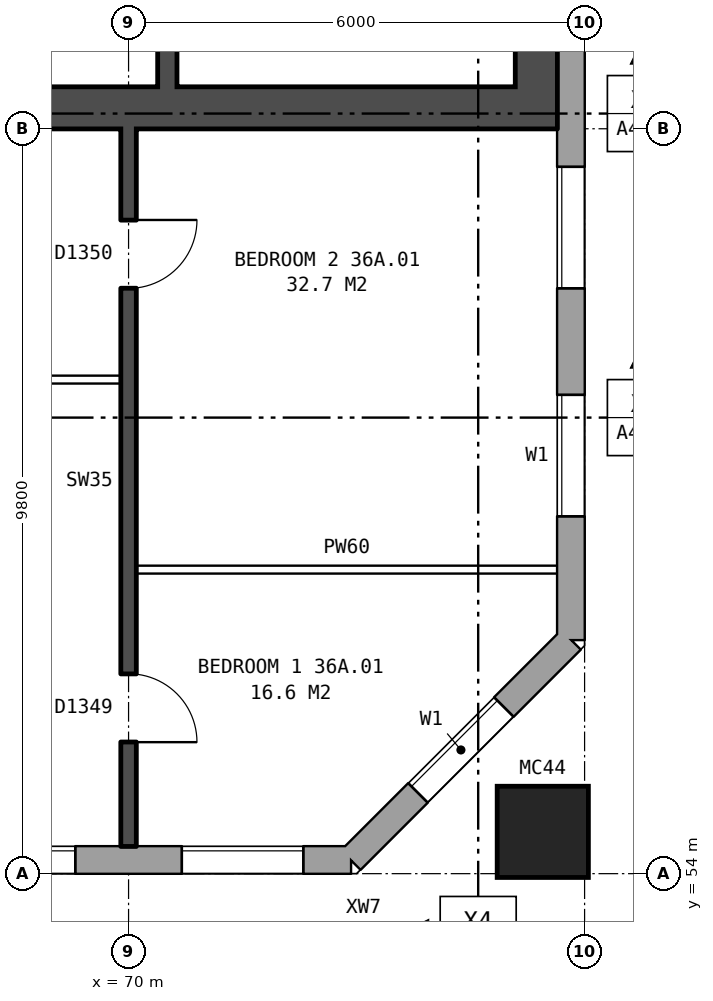
"""IFC4 building model, lengths in metres.
Left out: names, types, materials, properties, quantities, classifications, styles, units other than length and angle.
Written with IfcOpenShell. Run it as: python <this file> out.ifc"""

import sys

from ifc_helpers import new_model, si_unit, direction, frame, frame_2d, origin, origin_2d, place, context, subcontext, project, spatial, rectangle, hollow_rectangle, extrude, element, fill, save


model = new_model("IFC4")
c1 = context("Model", 3, precision=1e-05, world=origin(), true_north=direction((0.0, 1.0)))
c2 = subcontext(c1, "Body", "Model", "MODEL_VIEW")
j1 = project(units=[si_unit("LENGTHUNIT", "METRE"), si_unit("PLANEANGLEUNIT", "RADIAN")], contexts=[c1])
p1 = place(None, origin())
s1 = spatial("IfcSite", under=j1, at=p1, CompositionType="ELEMENT")
p2 = place(p1, origin())
s2 = spatial("IfcBuilding", under=s1, at=p2, CompositionType="ELEMENT")
p3 = place(p2, frame((0.0, 0.0, 129.9)))
s3 = spatial("IfcBuildingStorey", under=s2, at=p3, CompositionType="ELEMENT", Elevation=129.9)
p4 = place(p3, frame((75.45, 54.55, 0.0), z_axis=(0.0, 0.0, 1.0), x_axis=(1.0, 0.0, 0.0)))
e1 = element("IfcColumn", 1, at=p4, inside=s3, PredefinedType="COLUMN", context=c2, shape_type="SweptSolid", body=[
    extrude(hollow_rectangle(XDim=1.2, YDim=1.2, WallThickness=0.065, at=origin_2d()), origin(), (0.0, 0.0, 1.0), 3.1),
])
p5 = place(p3, frame((29.825, 54.18, 0.0), z_axis=(0.0, 0.0, 1.0), x_axis=(1.0, 0.0, 0.0)))
e2 = element("IfcWall", 2, at=p5, inside=s3, PredefinedType="STANDARD", context=c2, shape_type="SweptSolid", body=[
    extrude(rectangle(XDim=43.101, YDim=0.36, at=frame_2d((21.55, 0.0))), origin(), (0.0, 0.0, 1.0), 2.85),
])
p6 = place(p5, frame((1.875, 0.0, 0.8)))
e3 = element("IfcOpeningElement", 3, at=p6, cuts=e2, PredefinedType="OPENING", context=c2, shape_type="SweptSolid", body=[
    extrude(rectangle(XDim=1.6, YDim=1.8, at=frame_2d((0.8, 0.9))), frame((0.0, 0.19, 0.0), z_axis=(0.0, -1.0, 0.0), x_axis=(1.0, 0.0, 0.0)), (0.0, 0.0, 1.0), 0.38),
])
p7 = place(p5, frame((4.875, 0.0, 0.8)))
e4 = element("IfcOpeningElement", 4, at=p7, cuts=e2, PredefinedType="OPENING", context=c2, shape_type="SweptSolid", body=[
    extrude(rectangle(XDim=1.6, YDim=1.8, at=frame_2d((0.8, 0.9))), frame((0.0, 0.19, 0.0), z_axis=(0.0, -1.0, 0.0), x_axis=(1.0, 0.0, 0.0)), (0.0, 0.0, 1.0), 0.38),
])
p8 = place(p5, frame((6.775, 0.0, 0.8)))
e5 = element("IfcOpeningElement", 5, at=p8, cuts=e2, PredefinedType="OPENING", context=c2, shape_type="SweptSolid", body=[
    extrude(rectangle(XDim=1.6, YDim=1.8, at=frame_2d((0.8, 0.9))), frame((0.0, 0.19, 0.0), z_axis=(0.0, -1.0, 0.0), x_axis=(1.0, 0.0, 0.0)), (0.0, 0.0, 1.0), 0.38),
])
p9 = place(p5, frame((10.875, 0.0, 0.8)))
e6 = element("IfcOpeningElement", 6, at=p9, cuts=e2, PredefinedType="OPENING", context=c2, shape_type="SweptSolid", body=[
    extrude(rectangle(XDim=0.8, YDim=0.9, at=frame_2d((0.4, 0.45))), frame((0.0, 0.19, 0.0), z_axis=(0.0, -1.0, 0.0), x_axis=(1.0, 0.0, 0.0)), (0.0, 0.0, 1.0), 0.38),
])
p10 = place(p5, frame((13.875, 0.0, 0.8)))
e7 = element("IfcOpeningElement", 7, at=p10, cuts=e2, PredefinedType="OPENING", context=c2, shape_type="SweptSolid", body=[
    extrude(rectangle(XDim=1.6, YDim=1.8, at=frame_2d((0.8, 0.9))), frame((0.0, 0.19, 0.0), z_axis=(0.0, -1.0, 0.0), x_axis=(1.0, 0.0, 0.0)), (0.0, 0.0, 1.0), 0.38),
])
p11 = place(p5, frame((16.875, 0.0, 0.8)))
e8 = element("IfcOpeningElement", 8, at=p11, cuts=e2, PredefinedType="OPENING", context=c2, shape_type="SweptSolid", body=[
    extrude(rectangle(XDim=1.6, YDim=1.8, at=frame_2d((0.8, 0.9))), frame((0.0, 0.19, 0.0), z_axis=(0.0, -1.0, 0.0), x_axis=(1.0, 0.0, 0.0)), (0.0, 0.0, 1.0), 0.38),
])
p12 = place(p5, frame((19.875, 0.0, 0.8)))
e9 = element("IfcOpeningElement", 9, at=p12, cuts=e2, PredefinedType="OPENING", context=c2, shape_type="SweptSolid", body=[
    extrude(rectangle(XDim=1.6, YDim=1.8, at=frame_2d((0.8, 0.9))), frame((0.0, 0.19, 0.0), z_axis=(0.0, -1.0, 0.0), x_axis=(1.0, 0.0, 0.0)), (0.0, 0.0, 1.0), 0.38),
])
p13 = place(p5, frame((22.875, 0.0, 0.8)))
e10 = element("IfcOpeningElement", 10, at=p13, cuts=e2, PredefinedType="OPENING", context=c2, shape_type="SweptSolid", body=[
    extrude(rectangle(XDim=1.6, YDim=1.8, at=frame_2d((0.8, 0.9))), frame((0.0, 0.19, 0.0), z_axis=(0.0, -1.0, 0.0), x_axis=(1.0, 0.0, 0.0)), (0.0, 0.0, 1.0), 0.38),
])
p14 = place(p5, frame((25.875, 0.0, 0.8)))
e11 = element("IfcOpeningElement", 11, at=p14, cuts=e2, PredefinedType="OPENING", context=c2, shape_type="SweptSolid", body=[
    extrude(rectangle(XDim=1.6, YDim=1.8, at=frame_2d((0.8, 0.9))), frame((0.0, 0.19, 0.0), z_axis=(0.0, -1.0, 0.0), x_axis=(1.0, 0.0, 0.0)), (0.0, 0.0, 1.0), 0.38),
])
p15 = place(p5, frame((28.875, 0.0, 0.8)))
e12 = element("IfcOpeningElement", 12, at=p15, cuts=e2, PredefinedType="OPENING", context=c2, shape_type="SweptSolid", body=[
    extrude(rectangle(XDim=1.6, YDim=1.8, at=frame_2d((0.8, 0.9))), frame((0.0, 0.19, 0.0), z_axis=(0.0, -1.0, 0.0), x_axis=(1.0, 0.0, 0.0)), (0.0, 0.0, 1.0), 0.38),
])
p16 = place(p5, frame((31.325, 0.0, 0.15)))
e13 = element("IfcOpeningElement", 13, at=p16, cuts=e2, PredefinedType="OPENING", context=c2, shape_type="SweptSolid", body=[
    extrude(rectangle(XDim=0.6, YDim=1.8, at=frame_2d((0.3, 0.9))), frame((0.0, 0.19, 0.0), z_axis=(0.0, -1.0, 0.0), x_axis=(1.0, 0.0, 0.0)), (0.0, 0.0, 1.0), 0.38),
])
p17 = place(p5, frame((34.875, 0.0, 0.8)))
e14 = element("IfcOpeningElement", 14, at=p17, cuts=e2, PredefinedType="OPENING", context=c2, shape_type="SweptSolid", body=[
    extrude(rectangle(XDim=1.6, YDim=1.8, at=frame_2d((0.8, 0.9))), frame((0.0, 0.19, 0.0), z_axis=(0.0, -1.0, 0.0), x_axis=(1.0, 0.0, 0.0)), (0.0, 0.0, 1.0), 0.38),
])
p18 = place(p5, frame((37.875, 0.0, 0.8)))
e15 = element("IfcOpeningElement", 15, at=p18, cuts=e2, PredefinedType="OPENING", context=c2, shape_type="SweptSolid", body=[
    extrude(rectangle(XDim=1.6, YDim=1.8, at=frame_2d((0.8, 0.9))), frame((0.0, 0.19, 0.0), z_axis=(0.0, -1.0, 0.0), x_axis=(1.0, 0.0, 0.0)), (0.0, 0.0, 1.0), 0.38),
])
p19 = place(p5, frame((40.875, 0.0, 0.8)))
e16 = element("IfcOpeningElement", 16, at=p19, cuts=e2, PredefinedType="OPENING", context=c2, shape_type="SweptSolid", body=[
    extrude(rectangle(XDim=1.6, YDim=1.8, at=frame_2d((0.8, 0.9))), frame((0.0, 0.19, 0.0), z_axis=(0.0, -1.0, 0.0), x_axis=(1.0, 0.0, 0.0)), (0.0, 0.0, 1.0), 0.38),
])
p20 = place(p5, frame((8.675, 0.0, 1.3)))
e17 = element("IfcOpeningElement", 17, at=p20, cuts=e2, PredefinedType="OPENING", context=c2, shape_type="SweptSolid", body=[
    extrude(rectangle(XDim=0.6, YDim=1.2, at=frame_2d((0.3, 0.6))), frame((0.0, 0.19, 0.0), z_axis=(0.0, -1.0, 0.0), x_axis=(1.0, 0.0, 0.0)), (0.0, 0.0, 1.0), 0.38),
])
p21 = place(p5, frame((11.975, 0.0, 0.8)))
e18 = element("IfcOpeningElement", 18, at=p21, cuts=e2, PredefinedType="OPENING", context=c2, shape_type="SweptSolid", body=[
    extrude(rectangle(XDim=1.6, YDim=1.8, at=frame_2d((0.8, 0.9))), frame((0.0, 0.19, 0.0), z_axis=(0.0, -1.0, 0.0), x_axis=(1.0, 0.0, 0.0)), (0.0, 0.0, 1.0), 0.38),
])
p22 = place(p5, frame((32.225, 0.0, 0.25)))
e19 = element("IfcOpeningElement", 19, at=p22, cuts=e2, PredefinedType="OPENING", context=c2, shape_type="SweptSolid", body=[
    extrude(rectangle(XDim=0.6, YDim=0.9, at=frame_2d((0.3, 0.45))), frame((0.0, 0.19, 0.0), z_axis=(0.0, -1.0, 0.0), x_axis=(1.0, 0.0, 0.0)), (0.0, 0.0, 1.0), 0.38),
])
p23 = place(p3, frame((72.925, 54.18, 0.0), z_axis=(0.0, 0.0, 1.0), x_axis=(0.707106781187, 0.707106781187, 0.0)))
e20 = element("IfcWall", 20, at=p23, inside=s3, PredefinedType="STANDARD", context=c2, shape_type="SweptSolid", body=[
    extrude(rectangle(XDim=4.094, YDim=0.36, at=frame_2d((2.047, 0.0))), origin(), (0.0, 0.0, 1.0), 2.85),
])
p24 = place(p23, frame((1.247, 0.0, 0.8)))
e21 = element("IfcOpeningElement", 21, at=p24, cuts=e20, PredefinedType="OPENING", context=c2, shape_type="SweptSolid", body=[
    extrude(rectangle(XDim=1.6, YDim=1.8, at=frame_2d((0.8, 0.9))), frame((0.0, 0.19, 0.0), z_axis=(0.0, -1.0, 0.0), x_axis=(1.0, 0.0, 0.0)), (0.0, 0.0, 1.0), 0.38),
])
p25 = place(p3, frame((75.82, 57.075, 0.0), z_axis=(0.0, 0.0, 1.0), x_axis=(0.0, 1.0, 0.0)))
e22 = element("IfcWall", 22, at=p25, inside=s3, PredefinedType="STANDARD", context=c2, shape_type="SweptSolid", body=[
    extrude(rectangle(XDim=25.851, YDim=0.36, at=frame_2d((12.925, 0.0))), origin(), (0.0, 0.0, 1.0), 2.85),
])
p26 = place(p25, frame((1.625, 0.0, 0.8)))
e23 = element("IfcOpeningElement", 23, at=p26, cuts=e22, PredefinedType="OPENING", context=c2, shape_type="SweptSolid", body=[
    extrude(rectangle(XDim=1.6, YDim=1.8, at=frame_2d((0.8, 0.9))), frame((0.0, 0.19, 0.0), z_axis=(0.0, -1.0, 0.0), x_axis=(1.0, 0.0, 0.0)), (0.0, 0.0, 1.0), 0.38),
])
p27 = place(p25, frame((4.625, 0.0, 0.8)))
e24 = element("IfcOpeningElement", 24, at=p27, cuts=e22, PredefinedType="OPENING", context=c2, shape_type="SweptSolid", body=[
    extrude(rectangle(XDim=1.6, YDim=1.8, at=frame_2d((0.8, 0.9))), frame((0.0, 0.19, 0.0), z_axis=(0.0, -1.0, 0.0), x_axis=(1.0, 0.0, 0.0)), (0.0, 0.0, 1.0), 0.38),
])
p28 = place(p25, frame((19.625, 0.0, 0.8)))
e25 = element("IfcOpeningElement", 25, at=p28, cuts=e22, PredefinedType="OPENING", context=c2, shape_type="SweptSolid", body=[
    extrude(rectangle(XDim=1.6, YDim=1.8, at=frame_2d((0.8, 0.9))), frame((0.0, 0.19, 0.0), z_axis=(0.0, -1.0, 0.0), x_axis=(1.0, 0.0, 0.0)), (0.0, 0.0, 1.0), 0.38),
])
p29 = place(p25, frame((22.625, 0.0, 0.8)))
e26 = element("IfcOpeningElement", 26, at=p29, cuts=e22, PredefinedType="OPENING", context=c2, shape_type="SweptSolid", body=[
    extrude(rectangle(XDim=1.6, YDim=1.8, at=frame_2d((0.8, 0.9))), frame((0.0, 0.19, 0.0), z_axis=(0.0, -1.0, 0.0), x_axis=(1.0, 0.0, 0.0)), (0.0, 0.0, 1.0), 0.38),
])
p30 = place(p3, frame((75.365, 63.8, 0.0), z_axis=(0.0, 0.0, 1.0), x_axis=(0.0, 1.0, 0.0)))
e27 = element("IfcWall", 27, at=p30, inside=s3, PredefinedType="SHEAR", context=c2, shape_type="SweptSolid", body=[
    extrude(rectangle(XDim=12.4, YDim=0.55, at=frame_2d((6.2, 0.0))), origin(), (0.0, 0.0, 1.0), 2.85),
])
p31 = place(p3, frame((67.19, 64.075, 0.0), z_axis=(0.0, 0.0, 1.0), x_axis=(1.0, 0.0, 0.0)))
e28 = element("IfcWall", 28, at=p31, inside=s3, PredefinedType="SHEAR", context=c2, shape_type="SweptSolid", body=[
    extrude(rectangle(XDim=7.9, YDim=0.55, at=frame_2d((3.95, 0.0))), origin(), (0.0, 0.0, 1.0), 2.85),
])
p32 = place(p3, frame((70.51, 64.35, 0.0), z_axis=(0.0, 0.0, 1.0), x_axis=(0.0, 1.0, 0.0)))
e29 = element("IfcWall", 29, at=p32, inside=s3, PredefinedType="SHEAR", context=c2, shape_type="SweptSolid", body=[
    extrude(rectangle(XDim=2.375, YDim=0.25, at=frame_2d((1.188, 0.0))), origin(), (0.0, 0.0, 1.0), 2.85),
])
p33 = place(p3, frame((70.1, 58.0, 0.0), z_axis=(0.0, 0.0, 1.0), x_axis=(1.0, 0.0, 0.0)))
e30 = element("IfcWall", 30, at=p33, inside=s3, PredefinedType="PARTITIONING", context=c2, shape_type="SweptSolid", body=[
    extrude(rectangle(XDim=5.54, YDim=0.1, at=frame_2d((2.77, 0.0))), origin(), (0.0, 0.0, 1.0), 2.85),
])
p34 = place(p3, frame((64.1, 60.5, 0.0), z_axis=(0.0, 0.0, 1.0), x_axis=(1.0, 0.0, 0.0)))
e31 = element("IfcWall", 31, at=p34, inside=s3, PredefinedType="PARTITIONING", context=c2, shape_type="SweptSolid", body=[
    extrude(rectangle(XDim=5.8, YDim=0.1, at=frame_2d((2.9, 0.0))), origin(), (0.0, 0.0, 1.0), 2.85),
])
p35 = place(p34, frame((3.6, 0.0, 0.0)))
e32 = element("IfcOpeningElement", 32, at=p35, cuts=e31, PredefinedType="OPENING", context=c2, shape_type="SweptSolid", body=[
    extrude(rectangle(XDim=0.9, YDim=2.1, at=frame_2d((0.45, 1.05))), frame((0.0, 0.06, 0.0), z_axis=(0.0, -1.0, 0.0), x_axis=(1.0, 0.0, 0.0)), (0.0, 0.0, 1.0), 0.12),
])
p36 = place(p34, frame((0.7, 0.0, 0.0)))
e33 = element("IfcOpeningElement", 33, at=p36, cuts=e31, PredefinedType="OPENING", context=c2, shape_type="SweptSolid", body=[
    extrude(rectangle(XDim=0.9, YDim=2.1, at=frame_2d((0.45, 1.05))), frame((0.0, 0.06, 0.0), z_axis=(0.0, -1.0, 0.0), x_axis=(1.0, 0.0, 0.0)), (0.0, 0.0, 1.0), 0.12),
])
p37 = place(p3, frame((70.0, 54.36, 0.0), z_axis=(0.0, 0.0, 1.0), x_axis=(0.0, 1.0, 0.0)))
e34 = element("IfcWall", 34, at=p37, inside=s3, PredefinedType="SOLIDWALL", context=c2, shape_type="SweptSolid", body=[
    extrude(rectangle(XDim=9.44, YDim=0.2, at=frame_2d((4.72, 0.0))), origin(), (0.0, 0.0, 1.0), 2.85),
])
p38 = place(p37, frame((1.37, 0.0, 0.0)))
e35 = element("IfcOpeningElement", 35, at=p38, cuts=e34, PredefinedType="OPENING", context=c2, shape_type="SweptSolid", body=[
    extrude(rectangle(XDim=0.9, YDim=2.1, at=frame_2d((0.45, 1.05))), frame((0.0, 0.11, 0.0), z_axis=(0.0, -1.0, 0.0), x_axis=(1.0, 0.0, 0.0)), (0.0, 0.0, 1.0), 0.22),
])
p39 = place(p37, frame((7.34, 0.0, 0.0)))
e36 = element("IfcOpeningElement", 36, at=p39, cuts=e34, PredefinedType="OPENING", context=c2, shape_type="SweptSolid", body=[
    extrude(rectangle(XDim=0.9, YDim=2.1, at=frame_2d((0.45, 1.05))), frame((0.0, 0.11, 0.0), z_axis=(0.0, -1.0, 0.0), x_axis=(1.0, 0.0, 0.0)), (0.0, 0.0, 1.0), 0.22),
])
p40 = place(p18, origin())
e37 = element("IfcWindow", 37, at=p40, inside=s3, PartitioningType="SINGLE_PANEL", PredefinedType="WINDOW", context=c2, shape_type="SweptSolid", body=[
    extrude(rectangle(XDim=1.6, YDim=1.8, at=frame_2d((0.8, 0.9))), frame((0.0, 0.15, 0.0), z_axis=(0.0, -1.0, 0.0), x_axis=(1.0, 0.0, 0.0)), (0.0, 0.0, 1.0), 0.06),
])
fill(e15, e37)
p41 = place(p19, origin())
e38 = element("IfcWindow", 38, at=p41, inside=s3, PartitioningType="SINGLE_PANEL", PredefinedType="WINDOW", context=c2, shape_type="SweptSolid", body=[
    extrude(rectangle(XDim=1.6, YDim=1.8, at=frame_2d((0.8, 0.9))), frame((0.0, 0.15, 0.0), z_axis=(0.0, -1.0, 0.0), x_axis=(1.0, 0.0, 0.0)), (0.0, 0.0, 1.0), 0.06),
])
fill(e16, e38)
p42 = place(p24, origin())
e39 = element("IfcWindow", 39, at=p42, inside=s3, PartitioningType="SINGLE_PANEL", PredefinedType="WINDOW", context=c2, shape_type="SweptSolid", body=[
    extrude(rectangle(XDim=1.6, YDim=1.8, at=frame_2d((0.8, 0.9))), frame((0.0, 0.15, 0.0), z_axis=(0.0, -1.0, 0.0), x_axis=(1.0, 0.0, 0.0)), (0.0, 0.0, 1.0), 0.06),
])
fill(e21, e39)
p43 = place(p26, origin())
e40 = element("IfcWindow", 40, at=p43, inside=s3, PartitioningType="SINGLE_PANEL", PredefinedType="WINDOW", context=c2, shape_type="SweptSolid", body=[
    extrude(rectangle(XDim=1.6, YDim=1.8, at=frame_2d((0.8, 0.9))), frame((0.0, 0.15, 0.0), z_axis=(0.0, -1.0, 0.0), x_axis=(1.0, 0.0, 0.0)), (0.0, 0.0, 1.0), 0.06),
])
fill(e23, e40)
p44 = place(p27, origin())
e41 = element("IfcWindow", 41, at=p44, inside=s3, PartitioningType="SINGLE_PANEL", PredefinedType="WINDOW", context=c2, shape_type="SweptSolid", body=[
    extrude(rectangle(XDim=1.6, YDim=1.8, at=frame_2d((0.8, 0.9))), frame((0.0, 0.15, 0.0), z_axis=(0.0, -1.0, 0.0), x_axis=(1.0, 0.0, 0.0)), (0.0, 0.0, 1.0), 0.06),
])
fill(e24, e41)
p45 = place(p38, frame((0.9, 0.0, 0.0), z_axis=(0.0, 0.0, 1.0), x_axis=(-1.0, 0.0, 0.0)))
e42 = element("IfcDoor", 42, at=p45, inside=s3, OperationType="SINGLE_SWING_RIGHT", PredefinedType="DOOR", context=c2, shape_type="SweptSolid", body=[
    extrude(rectangle(XDim=0.9, YDim=2.1, at=frame_2d((0.45, 1.05))), frame((0.0, 0.025, 0.0), z_axis=(0.0, -1.0, 0.0), x_axis=(1.0, 0.0, 0.0)), (0.0, 0.0, 1.0), 0.05),
])
fill(e35, e42)
p46 = place(p39, frame((0.9, 0.0, 0.0), z_axis=(0.0, 0.0, 1.0), x_axis=(-1.0, 0.0, 0.0)))
e43 = element("IfcDoor", 43, at=p46, inside=s3, OperationType="SINGLE_SWING_LEFT", PredefinedType="DOOR", context=c2, shape_type="SweptSolid", body=[
    extrude(rectangle(XDim=0.9, YDim=2.1, at=frame_2d((0.45, 1.05))), frame((0.0, 0.025, 0.0), z_axis=(0.0, -1.0, 0.0), x_axis=(1.0, 0.0, 0.0)), (0.0, 0.0, 1.0), 0.05),
])
fill(e36, e43)
save(model, sys.argv[1])
